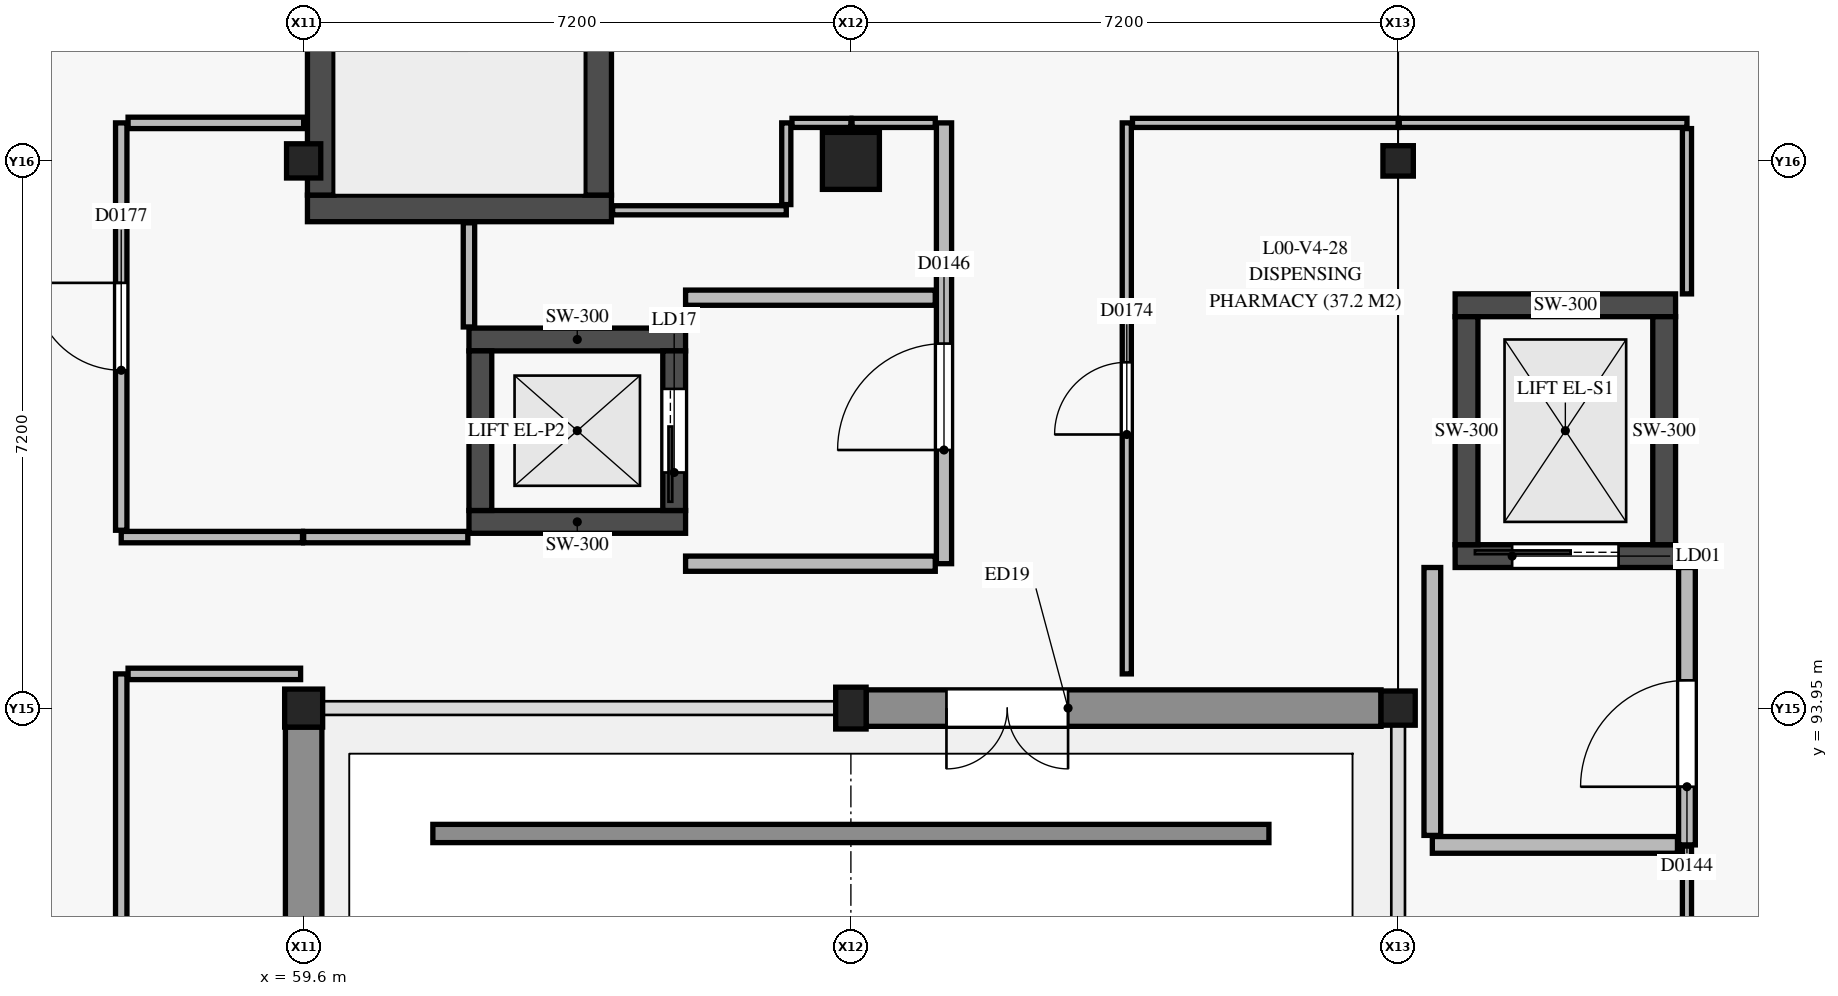
"""IFC4 building model, lengths in metres.
Left out: names, types, materials, properties, quantities, classifications, styles, units other than length and angle.
Written with IfcOpenShell. Run it as: python <this file> out.ifc"""

import sys

from ifc_helpers import new_model, si_unit, direction, frame, frame_2d, origin, origin_2d, place, context, subcontext, project, spatial, rectangle, extrude, element, fill, save


model = new_model("IFC4")
c1 = context("Model", 3, precision=1e-05, world=origin(), true_north=direction((0.0, 1.0)))
c2 = subcontext(c1, "Body", "Model", "MODEL_VIEW")
j1 = project(units=[si_unit("LENGTHUNIT", "METRE"), si_unit("PLANEANGLEUNIT", "RADIAN")], contexts=[c1])
p1 = place(None, origin())
s1 = spatial("IfcSite", under=j1, at=p1, CompositionType="ELEMENT")
p2 = place(p1, origin())
s2 = spatial("IfcBuilding", under=s1, at=p2, CompositionType="ELEMENT")
p3 = place(p2, origin())
s3 = spatial("IfcBuildingStorey", under=s2, at=p3, CompositionType="ELEMENT", Elevation=0.0)
p4 = place(p3, frame((59.6, 93.95, 0.0), z_axis=(0.0, 0.0, 1.0), x_axis=(1.0, 0.0, 0.0)))
e1 = element("IfcColumn", 1, at=p4, inside=s3, PredefinedType="COLUMN", context=c2, shape_type="SweptSolid", body=[
    extrude(rectangle(XDim=0.5, YDim=0.5, at=origin_2d()), origin(), (0.0, 0.0, 1.0), 4.8),
])
p5 = place(p3, frame((59.6, 101.15, 0.0), z_axis=(0.0, 0.0, 1.0), x_axis=(1.0, 0.0, 0.0)))
e2 = element("IfcColumn", 2, at=p5, inside=s3, PredefinedType="COLUMN", context=c2, shape_type="SweptSolid", body=[
    extrude(rectangle(XDim=0.45, YDim=0.45, at=origin_2d()), origin(), (0.0, 0.0, 1.0), 4.8),
])
p6 = place(p3, frame((66.8, 93.95, 0.0), z_axis=(0.0, 0.0, 1.0), x_axis=(1.0, 0.0, 0.0)))
e3 = element("IfcColumn", 3, at=p6, inside=s3, PredefinedType="COLUMN", context=c2, shape_type="SweptSolid", body=[
    extrude(rectangle(XDim=0.4, YDim=0.55, at=origin_2d()), origin(), (0.0, 0.0, 1.0), 4.8),
])
p7 = place(p3, frame((66.8, 101.15, 0.0), z_axis=(0.0, 0.0, 1.0), x_axis=(1.0, 0.0, 0.0)))
e4 = element("IfcColumn", 4, at=p7, inside=s3, PredefinedType="COLUMN", context=c2, shape_type="SweptSolid", body=[
    extrude(rectangle(XDim=0.75, YDim=0.75, at=origin_2d()), origin(), (0.0, 0.0, 1.0), 4.8),
])
p8 = place(p3, frame((74.0, 93.95, 0.0), z_axis=(0.0, 0.0, 1.0), x_axis=(1.0, 0.0, 0.0)))
e5 = element("IfcColumn", 5, at=p8, inside=s3, PredefinedType="COLUMN", context=c2, shape_type="SweptSolid", body=[
    extrude(rectangle(XDim=0.45, YDim=0.45, at=origin_2d()), origin(), (0.0, 0.0, 1.0), 4.8),
])
p9 = place(p3, frame((74.0, 101.15, 0.0), z_axis=(0.0, 0.0, 1.0), x_axis=(1.0, 0.0, 0.0)))
e6 = element("IfcColumn", 6, at=p9, inside=s3, PredefinedType="COLUMN", context=c2, shape_type="SweptSolid", body=[
    extrude(rectangle(XDim=0.4, YDim=0.4, at=origin_2d()), origin(), (0.0, 0.0, 1.0), 4.8),
])
p10 = place(p3, frame((59.65, 100.525, 0.0), z_axis=(0.0, 0.0, 1.0), x_axis=(1.0, 0.0, 0.0)))
e7 = element("IfcWall", 7, at=p10, inside=s3, PredefinedType="SHEAR", context=c2, shape_type="SweptSolid", body=[
    extrude(rectangle(XDim=4.0, YDim=0.35, at=frame_2d((2.0, 0.0))), origin(), (0.0, 0.0, 1.0), 4.55),
])
p11 = place(p3, frame((59.825, 100.7, 0.0), z_axis=(0.0, 0.0, 1.0), x_axis=(0.0, 1.0, 0.0)))
e8 = element("IfcWall", 8, at=p11, inside=s3, PredefinedType="SHEAR", context=c2, shape_type="SweptSolid", body=[
    extrude(rectangle(XDim=7.3, YDim=0.35, at=frame_2d((3.65, 0.0))), origin(), (0.0, 0.0, 1.0), 4.55),
])
p12 = place(p3, frame((63.475, 100.7, 0.0), z_axis=(0.0, 0.0, 1.0), x_axis=(0.0, 1.0, 0.0)))
e9 = element("IfcWall", 9, at=p12, inside=s3, PredefinedType="SHEAR", context=c2, shape_type="SweptSolid", body=[
    extrude(rectangle(XDim=7.3, YDim=0.35, at=frame_2d((3.65, 0.0))), origin(), (0.0, 0.0, 1.0), 4.55),
])
p13 = place(p12, frame((5.68, 0.0, 0.0)))
e10 = element("IfcOpeningElement", 10, at=p13, cuts=e9, PredefinedType="OPENING", context=c2, shape_type="SweptSolid", body=[
    extrude(rectangle(XDim=1.5, YDim=2.15, at=frame_2d((0.75, 1.075))), frame((0.0, 0.185, 0.0), z_axis=(0.0, -1.0, 0.0), x_axis=(1.0, 0.0, 0.0)), (0.0, 0.0, 1.0), 0.37),
])
p14 = place(p3, frame((74.75, 95.95, 0.0), z_axis=(0.0, 0.0, 1.0), x_axis=(1.0, 0.0, 0.0)))
e11 = element("IfcWall", 11, at=p14, inside=s3, PredefinedType="SHEAR", context=c2, shape_type="SweptSolid", body=[
    extrude(rectangle(XDim=2.9, YDim=0.3, at=frame_2d((1.45, 0.0))), origin(), (0.0, 0.0, 1.0), 4.55),
])
p15 = place(p14, frame((0.75, 0.0, 0.0)))
e12 = element("IfcOpeningElement", 12, at=p15, cuts=e11, PredefinedType="OPENING", context=c2, shape_type="SweptSolid", body=[
    extrude(rectangle(XDim=1.4, YDim=2.15, at=frame_2d((0.7, 1.075))), frame((0.0, 0.16, 0.0), z_axis=(0.0, -1.0, 0.0), x_axis=(1.0, 0.0, 0.0)), (0.0, 0.0, 1.0), 0.32),
])
p16 = place(p3, frame((74.75, 99.25, 0.0), z_axis=(0.0, 0.0, 1.0), x_axis=(1.0, 0.0, 0.0)))
e13 = element("IfcWall", 13, at=p16, inside=s3, PredefinedType="SHEAR", context=c2, shape_type="SweptSolid", body=[
    extrude(rectangle(XDim=2.9, YDim=0.3, at=frame_2d((1.45, 0.0))), origin(), (0.0, 0.0, 1.0), 4.55),
])
for number, where, z_axis, x_axis in (
    (14, (74.9, 96.1, 0.0), (0.0, 0.0, 1.0), (0.0, 1.0, 0.0)),
    (15, (77.5, 96.1, 0.0), (0.0, 0.0, 1.0), (0.0, 1.0, 0.0)),
):
    element("IfcWall", number, at=place(p3, frame(where, z_axis=z_axis, x_axis=x_axis)), inside=s3, PredefinedType="SHEAR", context=c2, shape_type="SweptSolid", body=[
        extrude(rectangle(XDim=3.0, YDim=0.3, at=frame_2d((1.5, 0.0))), origin(), (0.0, 0.0, 1.0), 4.55),
    ])
for number, where, z_axis, x_axis in (
    (16, (61.775, 96.4, 0.0), (0.0, 0.0, 1.0), (1.0, 0.0, 0.0)),
    (17, (61.775, 98.8, 0.0), (0.0, 0.0, 1.0), (1.0, 0.0, 0.0)),
):
    element("IfcWall", number, at=place(p3, frame(where, z_axis=z_axis, x_axis=x_axis)), inside=s3, PredefinedType="SHEAR", context=c2, shape_type="SweptSolid", body=[
        extrude(rectangle(XDim=2.85, YDim=0.3, at=frame_2d((1.425, 0.0))), origin(), (0.0, 0.0, 1.0), 4.55),
    ])
p17 = place(p3, frame((61.925, 96.55, 0.0), z_axis=(0.0, 0.0, 1.0), x_axis=(0.0, 1.0, 0.0)))
e18 = element("IfcWall", 18, at=p17, inside=s3, PredefinedType="SHEAR", context=c2, shape_type="SweptSolid", body=[
    extrude(rectangle(XDim=2.1, YDim=0.3, at=frame_2d((1.05, 0.0))), origin(), (0.0, 0.0, 1.0), 4.55),
])
p18 = place(p3, frame((64.475, 96.55, 0.0), z_axis=(0.0, 0.0, 1.0), x_axis=(0.0, 1.0, 0.0)))
e19 = element("IfcWall", 19, at=p18, inside=s3, PredefinedType="SHEAR", context=c2, shape_type="SweptSolid", body=[
    extrude(rectangle(XDim=2.1, YDim=0.3, at=frame_2d((1.05, 0.0))), origin(), (0.0, 0.0, 1.0), 4.55),
])
p19 = place(p18, frame((0.5, 0.0, 0.0)))
e20 = element("IfcOpeningElement", 20, at=p19, cuts=e19, PredefinedType="OPENING", context=c2, shape_type="SweptSolid", body=[
    extrude(rectangle(XDim=1.1, YDim=2.15, at=frame_2d((0.55, 1.075))), frame((0.0, 0.16, 0.0), z_axis=(0.0, -1.0, 0.0), x_axis=(1.0, 0.0, 0.0)), (0.0, 0.0, 1.0), 0.32),
])
p20 = place(p3, frame((73.775, 93.95, 0.0), z_axis=(0.0, 0.0, 1.0), x_axis=(-1.0, 0.0, 0.0)))
e21 = element("IfcWall", 21, at=p20, inside=s3, PredefinedType="SOLIDWALL", context=c2, shape_type="SweptSolid", body=[
    extrude(rectangle(XDim=6.775, YDim=0.48, at=frame_2d((3.387, 0.0))), origin(), (0.0, 0.0, 1.0), 3.73),
])
p21 = place(p20, frame((4.118, 0.0, 0.0)))
e22 = element("IfcOpeningElement", 22, at=p21, cuts=e21, PredefinedType="OPENING", context=c2, shape_type="SweptSolid", body=[
    extrude(rectangle(XDim=1.6, YDim=2.3, at=frame_2d((0.8, 1.15))), frame((0.0, 0.25, 0.0), z_axis=(0.0, -1.0, 0.0), x_axis=(1.0, 0.0, 0.0)), (0.0, 0.0, 1.0), 0.5),
])
p22 = place(p3, frame((59.6, 93.7, 0.0), z_axis=(0.0, 0.0, 1.0), x_axis=(0.0, -1.0, 0.0)))
e23 = element("IfcWall", 23, at=p22, inside=s3, PredefinedType="SOLIDWALL", context=c2, shape_type="SweptSolid", body=[
    extrude(rectangle(XDim=6.675, YDim=0.48, at=frame_2d((3.337, 0.0))), origin(), (0.0, 0.0, 1.0), 3.73),
])
p23 = place(p22, frame((2.738, 0.0, 0.9)))
e24 = element("IfcOpeningElement", 24, at=p23, cuts=e23, PredefinedType="OPENING", context=c2, shape_type="SweptSolid", body=[
    extrude(rectangle(XDim=1.2, YDim=1.8, at=frame_2d((0.6, 0.9))), frame((0.0, 0.25, 0.0), z_axis=(0.0, -1.0, 0.0), x_axis=(1.0, 0.0, 0.0)), (0.0, 0.0, 1.0), 0.5),
])
p24 = place(p3, frame((61.3, 92.3, 0.0), z_axis=(0.0, 0.0, 1.0), x_axis=(1.0, 0.0, 0.0)))
e25 = element("IfcWall", 25, at=p24, inside=s3, PredefinedType="PARAPET", context=c2, shape_type="SweptSolid", body=[
    extrude(rectangle(XDim=11.0, YDim=0.24, at=frame_2d((5.5, 0.0))), origin(), (0.0, 0.0, 1.0), 1.1),
])
p25 = place(p3, frame((77.8, 92.15, 0.0), z_axis=(0.0, 0.0, 1.0), x_axis=(0.0, 1.0, 0.0)))
e26 = element("IfcWall", 26, at=p25, inside=s3, PredefinedType="PARTITIONING", context=c2, shape_type="SweptSolid", body=[
    extrude(rectangle(XDim=3.65, YDim=0.22, at=frame_2d((1.825, 0.0))), origin(), (0.0, 0.0, 1.0), 3.885),
])
p26 = place(p25, frame((0.765, 0.0, 0.0)))
e27 = element("IfcOpeningElement", 27, at=p26, cuts=e26, PredefinedType="OPENING", context=c2, shape_type="SweptSolid", body=[
    extrude(rectangle(XDim=1.4, YDim=2.2, at=frame_2d((0.7, 1.1))), frame((0.0, 0.12, 0.0), z_axis=(0.0, -1.0, 0.0), x_axis=(1.0, 0.0, 0.0)), (0.0, 0.0, 1.0), 0.24),
])
p27 = place(p3, frame((68.025, 95.85, 0.0), z_axis=(0.0, 0.0, 1.0), x_axis=(0.0, 1.0, 0.0)))
e28 = element("IfcWall", 28, at=p27, inside=s3, PredefinedType="PARTITIONING", context=c2, shape_type="SweptSolid", body=[
    extrude(rectangle(XDim=5.8, YDim=0.2, at=frame_2d((2.9, 0.0))), origin(), (0.0, 0.0, 1.0), 4.055),
])
p28 = place(p27, frame((1.496, 0.0, 0.0)))
e29 = element("IfcOpeningElement", 29, at=p28, cuts=e28, PredefinedType="OPENING", context=c2, shape_type="SweptSolid", body=[
    extrude(rectangle(XDim=1.4, YDim=2.2, at=frame_2d((0.7, 1.1))), frame((0.0, 0.11, 0.0), z_axis=(0.0, -1.0, 0.0), x_axis=(1.0, 0.0, 0.0)), (0.0, 0.0, 1.0), 0.22),
])
p29 = place(p3, frame((64.625, 95.85, 0.0), z_axis=(0.0, 0.0, 1.0), x_axis=(1.0, 0.0, 0.0)))
e30 = element("IfcWall", 30, at=p29, inside=s3, PredefinedType="PARTITIONING", context=c2, shape_type="SweptSolid", body=[
    extrude(rectangle(XDim=3.285, YDim=0.2, at=frame_2d((1.643, 0.0))), origin(), (0.0, 0.0, 1.0), 4.055),
])
p30 = place(p3, frame((74.45, 92.15, 0.0), z_axis=(0.0, 0.0, 1.0), x_axis=(1.0, 0.0, 0.0)))
e31 = element("IfcWall", 31, at=p30, inside=s3, PredefinedType="PARTITIONING", context=c2, shape_type="SweptSolid", body=[
    extrude(rectangle(XDim=3.225, YDim=0.22, at=frame_2d((1.613, 0.0))), origin(), (0.0, 0.0, 1.0), 4.55),
])
p31 = place(p3, frame((74.45, 92.275, 0.0), z_axis=(0.0, 0.0, 1.0), x_axis=(0.0, 1.0, 0.0)))
e32 = element("IfcWall", 32, at=p31, inside=s3, PredefinedType="PARTITIONING", context=c2, shape_type="SweptSolid", body=[
    extrude(rectangle(XDim=3.525, YDim=0.22, at=frame_2d((1.763, 0.0))), origin(), (0.0, 0.0, 1.0), 3.885),
])
p32 = place(p3, frame((64.625, 99.35, 0.0), z_axis=(0.0, 0.0, 1.0), x_axis=(1.0, 0.0, 0.0)))
e33 = element("IfcWall", 33, at=p32, inside=s3, PredefinedType="PARTITIONING", context=c2, shape_type="SweptSolid", body=[
    extrude(rectangle(XDim=3.285, YDim=0.2, at=frame_2d((1.643, 0.0))), origin(), (0.0, 0.0, 1.0), 4.055),
])
p33 = place(p3, frame((57.2, 82.54, 0.0), z_axis=(0.0, 0.0, 1.0), x_axis=(0.0, 1.0, 0.0)))
e34 = element("IfcWall", 34, at=p33, inside=s3, PredefinedType="PARTITIONING", context=c2, shape_type="SweptSolid", body=[
    extrude(rectangle(XDim=11.86, YDim=0.15, at=frame_2d((5.93, 0.0))), origin(), (0.0, 0.0, 1.0), 3.835),
])
p34 = place(p33, frame((5.13, 0.0, 0.0)))
e35 = element("IfcOpeningElement", 35, at=p34, cuts=e34, PredefinedType="OPENING", context=c2, shape_type="SweptSolid", body=[
    extrude(rectangle(XDim=1.6, YDim=2.25, at=frame_2d((0.8, 1.125))), frame((0.0, 0.085, 0.0), z_axis=(0.0, -1.0, 0.0), x_axis=(1.0, 0.0, 0.0)), (0.0, 0.0, 1.0), 0.17),
])
p35 = place(p3, frame((57.29, 94.4, 0.0), z_axis=(0.0, 0.0, 1.0), x_axis=(1.0, 0.0, 0.0)))
e36 = element("IfcWall", 36, at=p35, inside=s3, PredefinedType="PARTITIONING", context=c2, shape_type="SweptSolid", body=[
    extrude(rectangle(XDim=2.27, YDim=0.15, at=frame_2d((1.135, 0.0))), origin(), (0.0, 0.0, 1.0), 3.885),
])
p36 = place(p3, frame((59.6, 96.2, 0.0), z_axis=(0.0, 0.0, 1.0), x_axis=(1.0, 0.0, 0.0)))
e37 = element("IfcWall", 37, at=p36, inside=s3, PredefinedType="PARTITIONING", context=c2, shape_type="SweptSolid", body=[
    extrude(rectangle(XDim=2.16, YDim=0.15, at=frame_2d((1.08, 0.0))), origin(), (0.0, 0.0, 1.0), 3.885),
])
p37 = place(p3, frame((57.2, 96.2, 0.0), z_axis=(0.0, 0.0, 1.0), x_axis=(1.0, 0.0, 0.0)))
e38 = element("IfcWall", 38, at=p37, inside=s3, PredefinedType="PARTITIONING", context=c2, shape_type="SweptSolid", body=[
    extrude(rectangle(XDim=2.385, YDim=0.15, at=frame_2d((1.192, 0.0))), origin(), (0.0, 0.0, 1.0), 3.885),
])
p38 = place(p3, frame((57.2, 96.29, 0.0), z_axis=(0.0, 0.0, 1.0), x_axis=(0.0, 1.0, 0.0)))
e39 = element("IfcWall", 39, at=p38, inside=s3, PredefinedType="PARTITIONING", context=c2, shape_type="SweptSolid", body=[
    extrude(rectangle(XDim=5.36, YDim=0.15, at=frame_2d((2.68, 0.0))), origin(), (0.0, 0.0, 1.0), 3.955),
])
p39 = place(p38, frame((2.105, 0.0, 0.0)))
e40 = element("IfcOpeningElement", 40, at=p39, cuts=e39, PredefinedType="OPENING", context=c2, shape_type="SweptSolid", body=[
    extrude(rectangle(XDim=1.15, YDim=2.15, at=frame_2d((0.575, 1.075))), frame((0.0, 0.085, 0.0), z_axis=(0.0, -1.0, 0.0), x_axis=(1.0, 0.0, 0.0)), (0.0, 0.0, 1.0), 0.17),
])
p40 = place(p3, frame((57.29, 101.65, 0.0), z_axis=(0.0, 0.0, 1.0), x_axis=(1.0, 0.0, 0.0)))
e41 = element("IfcWall", 41, at=p40, inside=s3, PredefinedType="PARTITIONING", context=c2, shape_type="SweptSolid", body=[
    extrude(rectangle(XDim=2.31, YDim=0.15, at=frame_2d((1.155, 0.0))), origin(), (0.0, 0.0, 1.0), 4.015),
])
p41 = place(p3, frame((77.8, 89.85, 0.0), z_axis=(0.0, 0.0, 1.0), x_axis=(0.0, 1.0, 0.0)))
e42 = element("IfcWall", 42, at=p41, inside=s3, PredefinedType="PARTITIONING", context=c2, shape_type="SweptSolid", body=[
    extrude(rectangle(XDim=2.285, YDim=0.12, at=frame_2d((1.143, 0.0))), origin(), (0.0, 0.0, 1.0), 4.115),
])
p42 = place(p3, frame((70.43, 94.4, 0.0), z_axis=(0.0, 0.0, 1.0), x_axis=(0.0, 1.0, 0.0)))
e43 = element("IfcWall", 43, at=p42, inside=s3, PredefinedType="PARTITIONING", context=c2, shape_type="SweptSolid", body=[
    extrude(rectangle(XDim=7.25, YDim=0.12, at=frame_2d((3.625, 0.0))), origin(), (0.0, 0.0, 1.0), 4.055),
])
p43 = place(p42, frame((3.15, 0.0, 0.0)))
e44 = element("IfcOpeningElement", 44, at=p43, cuts=e43, PredefinedType="OPENING", context=c2, shape_type="SweptSolid", body=[
    extrude(rectangle(XDim=0.95, YDim=2.1, at=frame_2d((0.475, 1.05))), frame((0.0, 0.07, 0.0), z_axis=(0.0, -1.0, 0.0), x_axis=(1.0, 0.0, 0.0)), (0.0, 0.0, 1.0), 0.14),
])
p44 = place(p3, frame((70.505, 101.65, 0.0), z_axis=(0.0, 0.0, 1.0), x_axis=(1.0, 0.0, 0.0)))
e45 = element("IfcWall", 45, at=p44, inside=s3, PredefinedType="PARTITIONING", context=c2, shape_type="SweptSolid", body=[
    extrude(rectangle(XDim=3.495, YDim=0.12, at=frame_2d((1.748, 0.0))), origin(), (0.0, 0.0, 1.0), 4.015),
])
p45 = place(p3, frame((74.015, 101.65, 0.0), z_axis=(0.0, 0.0, 1.0), x_axis=(1.0, 0.0, 0.0)))
e46 = element("IfcWall", 46, at=p45, inside=s3, PredefinedType="PARTITIONING", context=c2, shape_type="SweptSolid", body=[
    extrude(rectangle(XDim=3.785, YDim=0.12, at=frame_2d((1.893, 0.0))), origin(), (0.0, 0.0, 1.0), 4.015),
])
p46 = place(p3, frame((77.8, 99.4, 0.0), z_axis=(0.0, 0.0, 1.0), x_axis=(0.0, 1.0, 0.0)))
e47 = element("IfcWall", 47, at=p46, inside=s3, PredefinedType="PARTITIONING", context=c2, shape_type="SweptSolid", body=[
    extrude(rectangle(XDim=2.175, YDim=0.12, at=frame_2d((1.087, 0.0))), origin(), (0.0, 0.0, 1.0), 3.815),
])
p47 = place(p3, frame((63.665, 100.5, 0.0), z_axis=(0.0, 0.0, 1.0), x_axis=(1.0, 0.0, 0.0)))
e48 = element("IfcWall", 48, at=p47, inside=s3, PredefinedType="PARTITIONING", context=c2, shape_type="SweptSolid", body=[
    extrude(rectangle(XDim=2.285, YDim=0.12, at=frame_2d((1.143, 0.0))), origin(), (0.0, 0.0, 1.0), 4.55),
])
p48 = place(p3, frame((65.95, 100.575, 0.0), z_axis=(0.0, 0.0, 1.0), x_axis=(0.0, 1.0, 0.0)))
e49 = element("IfcWall", 49, at=p48, inside=s3, PredefinedType="PARTITIONING", context=c2, shape_type="SweptSolid", body=[
    extrude(rectangle(XDim=1.075, YDim=0.12, at=frame_2d((0.538, 0.0))), origin(), (0.0, 0.0, 1.0), 4.55),
])
p49 = place(p3, frame((66.025, 101.65, 0.0), z_axis=(0.0, 0.0, 1.0), x_axis=(1.0, 0.0, 0.0)))
e50 = element("IfcWall", 50, at=p49, inside=s3, PredefinedType="PARTITIONING", context=c2, shape_type="SweptSolid", body=[
    extrude(rectangle(XDim=0.775, YDim=0.12, at=frame_2d((0.388, 0.0))), origin(), (0.0, 0.0, 1.0), 3.815),
])
p50 = place(p3, frame((66.815, 101.65, 0.0), z_axis=(0.0, 0.0, 1.0), x_axis=(1.0, 0.0, 0.0)))
e51 = element("IfcWall", 51, at=p50, inside=s3, PredefinedType="PARTITIONING", context=c2, shape_type="SweptSolid", body=[
    extrude(rectangle(XDim=1.095, YDim=0.12, at=frame_2d((0.547, 0.0))), origin(), (0.0, 0.0, 1.0), 3.815),
])
p51 = place(p3, frame((61.775, 98.965, 0.0), z_axis=(0.0, 0.0, 1.0), x_axis=(0.0, 1.0, 0.0)))
e52 = element("IfcWall", 52, at=p51, inside=s3, PredefinedType="PARTITIONING", context=c2, shape_type="SweptSolid", body=[
    extrude(rectangle(XDim=1.37, YDim=0.15, at=frame_2d((0.685, 0.0))), origin(), (0.0, 0.0, 1.0), 4.55),
])
p52 = place(p21, origin())
e53 = element("IfcDoor", 53, at=p52, inside=s3, OperationType="DOUBLE_DOOR_SINGLE_SWING", PredefinedType="DOOR", context=c2, shape_type="SweptSolid", body=[
    extrude(rectangle(XDim=1.6, YDim=2.3, at=frame_2d((0.8, 1.15))), frame((0.0, 0.025, 0.0), z_axis=(0.0, -1.0, 0.0), x_axis=(1.0, 0.0, 0.0)), (0.0, 0.0, 1.0), 0.05),
])
fill(e22, e53)
p53 = place(p15, origin())
e54 = element("IfcDoor", 54, at=p53, inside=s3, OperationType="SLIDING_TO_LEFT", PredefinedType="DOOR", context=c2, shape_type="SweptSolid", body=[
    extrude(rectangle(XDim=1.4, YDim=2.15, at=frame_2d((0.7, 1.075))), frame((0.0, 0.025, 0.0), z_axis=(0.0, -1.0, 0.0), x_axis=(1.0, 0.0, 0.0)), (0.0, 0.0, 1.0), 0.05),
])
fill(e12, e54)
p54 = place(p19, origin())
e55 = element("IfcDoor", 55, at=p54, inside=s3, OperationType="SLIDING_TO_LEFT", PredefinedType="DOOR", context=c2, shape_type="SweptSolid", body=[
    extrude(rectangle(XDim=1.1, YDim=2.15, at=frame_2d((0.55, 1.075))), frame((0.0, 0.025, 0.0), z_axis=(0.0, -1.0, 0.0), x_axis=(1.0, 0.0, 0.0)), (0.0, 0.0, 1.0), 0.05),
])
fill(e20, e55)
p55 = place(p26, origin())
e56 = element("IfcDoor", 56, at=p55, inside=s3, OperationType="SINGLE_SWING_LEFT", PredefinedType="DOOR", context=c2, shape_type="SweptSolid", body=[
    extrude(rectangle(XDim=1.4, YDim=2.2, at=frame_2d((0.7, 1.1))), frame((0.0, 0.025, 0.0), z_axis=(0.0, -1.0, 0.0), x_axis=(1.0, 0.0, 0.0)), (0.0, 0.0, 1.0), 0.05),
])
fill(e27, e56)
p56 = place(p28, origin())
e57 = element("IfcDoor", 57, at=p56, inside=s3, OperationType="SINGLE_SWING_LEFT", PredefinedType="DOOR", context=c2, shape_type="SweptSolid", body=[
    extrude(rectangle(XDim=1.4, YDim=2.2, at=frame_2d((0.7, 1.1))), frame((0.0, 0.025, 0.0), z_axis=(0.0, -1.0, 0.0), x_axis=(1.0, 0.0, 0.0)), (0.0, 0.0, 1.0), 0.05),
])
fill(e29, e57)
p57 = place(p43, origin())
e58 = element("IfcDoor", 58, at=p57, inside=s3, OperationType="SINGLE_SWING_LEFT", PredefinedType="DOOR", context=c2, shape_type="SweptSolid", body=[
    extrude(rectangle(XDim=0.95, YDim=2.1, at=frame_2d((0.475, 1.05))), frame((0.0, 0.025, 0.0), z_axis=(0.0, -1.0, 0.0), x_axis=(1.0, 0.0, 0.0)), (0.0, 0.0, 1.0), 0.05),
])
fill(e44, e58)
p58 = place(p39, origin())
e59 = element("IfcDoor", 59, at=p58, inside=s3, OperationType="SINGLE_SWING_RIGHT", PredefinedType="DOOR", context=c2, shape_type="SweptSolid", body=[
    extrude(rectangle(XDim=1.15, YDim=2.15, at=frame_2d((0.575, 1.075))), frame((0.0, 0.025, 0.0), z_axis=(0.0, -1.0, 0.0), x_axis=(1.0, 0.0, 0.0)), (0.0, 0.0, 1.0), 0.05),
])
fill(e40, e59)
save(model, sys.argv[1])
